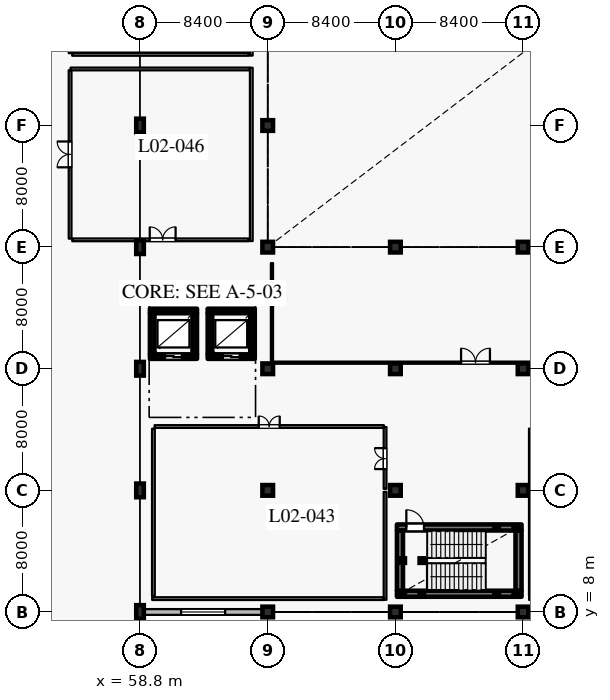
"""IFC4 building model, lengths in metres.
Left out: names, types, materials, properties, quantities, classifications, styles, units other than length and angle.
Written with IfcOpenShell. Run it as: python <this file> out.ifc"""

import sys

from ifc_helpers import new_model, si_unit, direction, frame, frame_2d, origin, origin_2d, place, context, subcontext, project, spatial, rectangle, hollow_rectangle, extrude, element, fill, save


model = new_model("IFC4")
c1 = context("Model", 3, precision=1e-05, world=origin(), true_north=direction((0.0, 1.0)))
c2 = subcontext(c1, "Body", "Model", "MODEL_VIEW")
j1 = project(units=[si_unit("LENGTHUNIT", "METRE"), si_unit("PLANEANGLEUNIT", "RADIAN")], contexts=[c1])
p1 = place(None, origin())
s1 = spatial("IfcSite", under=j1, at=p1, CompositionType="ELEMENT")
p2 = place(p1, origin())
s2 = spatial("IfcBuilding", under=s1, at=p2, CompositionType="ELEMENT")
p3 = place(p2, frame((0.0, 0.0, 11.4)))
s3 = spatial("IfcBuildingStorey", under=s2, at=p3, CompositionType="ELEMENT", Elevation=11.4)
for number, where, z_axis, x_axis in (
    (1, (58.8, 8.0, 0.0), (0.0, 0.0, 1.0), (1.0, 0.0, 0.0)),
    (2, (58.8, 16.0, 0.0), (0.0, 0.0, 1.0), (1.0, 0.0, 0.0)),
    (3, (58.8, 24.0, 0.0), (0.0, 0.0, 1.0), (1.0, 0.0, 0.0)),
    (4, (58.8, 32.0, 0.0), (0.0, 0.0, 1.0), (1.0, 0.0, 0.0)),
    (5, (58.8, 40.0, 0.0), (0.0, 0.0, 1.0), (1.0, 0.0, 0.0)),
):
    element("IfcColumn", number, at=place(p3, frame(where, z_axis=z_axis, x_axis=x_axis)), inside=s3, PredefinedType="COLUMN", context=c2, shape_type="SweptSolid", body=[
        extrude(hollow_rectangle(XDim=0.5, YDim=0.9, WallThickness=0.024, at=origin_2d()), origin(), (0.0, 0.0, 1.0), 4.8),
    ])
for number, where, z_axis, x_axis in (
    (6, (67.2, 8.0, 0.0), (0.0, 0.0, 1.0), (1.0, 0.0, 0.0)),
    (7, (67.2, 16.0, 0.0), (0.0, 0.0, 1.0), (1.0, 0.0, 0.0)),
    (8, (67.2, 24.0, 0.0), (0.0, 0.0, 1.0), (1.0, 0.0, 0.0)),
    (9, (67.2, 32.0, 0.0), (0.0, 0.0, 1.0), (1.0, 0.0, 0.0)),
    (10, (67.2, 40.0, 0.0), (0.0, 0.0, 1.0), (1.0, 0.0, 0.0)),
    (11, (75.6, 8.0, 0.0), (0.0, 0.0, 1.0), (1.0, 0.0, 0.0)),
    (12, (75.6, 16.0, 0.0), (0.0, 0.0, 1.0), (1.0, 0.0, 0.0)),
    (13, (75.6, 24.0, 0.0), (0.0, 0.0, 1.0), (1.0, 0.0, 0.0)),
    (14, (75.6, 32.0, 0.0), (0.0, 0.0, 1.0), (1.0, 0.0, 0.0)),
    (15, (84.0, 8.0, 0.0), (0.0, 0.0, 1.0), (1.0, 0.0, 0.0)),
    (16, (84.0, 16.0, 0.0), (0.0, 0.0, 1.0), (1.0, 0.0, 0.0)),
    (17, (84.0, 24.0, 0.0), (0.0, 0.0, 1.0), (1.0, 0.0, 0.0)),
    (18, (84.0, 32.0, 0.0), (0.0, 0.0, 1.0), (1.0, 0.0, 0.0)),
):
    element("IfcColumn", number, at=place(p3, frame(where, z_axis=z_axis, x_axis=x_axis)), inside=s3, PredefinedType="COLUMN", context=c2, shape_type="SweptSolid", body=[
        extrude(rectangle(XDim=0.7, YDim=0.7, at=origin_2d()), origin(), (0.0, 0.0, 1.0), 4.8),
    ])
p4 = place(p3, frame((66.85, 8.0, 0.0), z_axis=(0.0, 0.0, 1.0), x_axis=(-1.0, 0.0, 0.0)))
e19 = element("IfcWall", 19, at=p4, inside=s3, PredefinedType="SOLIDWALL", context=c2, shape_type="SweptSolid", body=[
    extrude(rectangle(XDim=7.8, YDim=0.38, at=frame_2d((3.9, 0.0))), origin(), (0.0, 0.0, 1.0), 3.84),
])
p5 = place(p4, frame((2.45, 0.0, 0.95)))
e20 = element("IfcOpeningElement", 20, at=p5, cuts=e19, PredefinedType="OPENING", context=c2, shape_type="SweptSolid", body=[
    extrude(rectangle(XDim=2.9, YDim=1.75, at=frame_2d((1.45, 0.875))), frame((0.0, 0.2, 0.0), z_axis=(0.0, -1.0, 0.0), x_axis=(1.0, 0.0, 0.0)), (0.0, 0.0, 1.0), 0.4),
])
p6 = place(p3, frame((59.45, 24.8, 0.0), z_axis=(0.0, 0.0, 1.0), x_axis=(1.0, 0.0, 0.0)))
e21 = element("IfcWall", 21, at=p6, inside=s3, PredefinedType="SHEAR", context=c2, shape_type="SweptSolid", body=[
    extrude(rectangle(XDim=3.1, YDim=0.3, at=frame_2d((1.55, 0.0))), origin(), (0.0, 0.0, 1.0), 4.535),
])
p7 = place(p6, frame((1.0, 0.0, 0.0)))
e22 = element("IfcOpeningElement", 22, at=p7, cuts=e21, PredefinedType="OPENING", context=c2, shape_type="SweptSolid", body=[
    extrude(rectangle(XDim=1.1, YDim=2.2, at=frame_2d((0.55, 1.1))), frame((0.0, 0.16, 0.0), z_axis=(0.0, -1.0, 0.0), x_axis=(1.0, 0.0, 0.0)), (0.0, 0.0, 1.0), 0.32),
])
p8 = place(p3, frame((62.4, 24.955, 0.0), z_axis=(0.0, 0.0, 1.0), x_axis=(0.0, 1.0, 0.0)))
e23 = element("IfcWall", 23, at=p8, inside=s3, PredefinedType="SHEAR", context=c2, shape_type="SweptSolid", body=[
    extrude(rectangle(XDim=2.69, YDim=0.3, at=frame_2d((1.345, 0.0))), origin(), (0.0, 0.0, 1.0), 4.535),
])
p9 = place(p3, frame((62.55, 27.8, 0.0), z_axis=(0.0, 0.0, 1.0), x_axis=(-1.0, 0.0, 0.0)))
e24 = element("IfcWall", 24, at=p9, inside=s3, PredefinedType="SHEAR", context=c2, shape_type="SweptSolid", body=[
    extrude(rectangle(XDim=3.1, YDim=0.3, at=frame_2d((1.55, 0.0))), origin(), (0.0, 0.0, 1.0), 4.535),
])
p10 = place(p3, frame((59.6, 27.645, 0.0), z_axis=(0.0, 0.0, 1.0), x_axis=(0.0, -1.0, 0.0)))
e25 = element("IfcWall", 25, at=p10, inside=s3, PredefinedType="SHEAR", context=c2, shape_type="SweptSolid", body=[
    extrude(rectangle(XDim=2.69, YDim=0.3, at=frame_2d((1.345, 0.0))), origin(), (0.0, 0.0, 1.0), 4.535),
])
p11 = place(p3, frame((63.25, 24.8, 0.0), z_axis=(0.0, 0.0, 1.0), x_axis=(1.0, 0.0, 0.0)))
e26 = element("IfcWall", 26, at=p11, inside=s3, PredefinedType="SHEAR", context=c2, shape_type="SweptSolid", body=[
    extrude(rectangle(XDim=3.1, YDim=0.3, at=frame_2d((1.55, 0.0))), origin(), (0.0, 0.0, 1.0), 4.535),
])
p12 = place(p11, frame((1.0, 0.0, 0.0)))
e27 = element("IfcOpeningElement", 27, at=p12, cuts=e26, PredefinedType="OPENING", context=c2, shape_type="SweptSolid", body=[
    extrude(rectangle(XDim=1.1, YDim=2.2, at=frame_2d((0.55, 1.1))), frame((0.0, 0.16, 0.0), z_axis=(0.0, -1.0, 0.0), x_axis=(1.0, 0.0, 0.0)), (0.0, 0.0, 1.0), 0.32),
])
p13 = place(p3, frame((66.2, 24.955, 0.0), z_axis=(0.0, 0.0, 1.0), x_axis=(0.0, 1.0, 0.0)))
e28 = element("IfcWall", 28, at=p13, inside=s3, PredefinedType="SHEAR", context=c2, shape_type="SweptSolid", body=[
    extrude(rectangle(XDim=2.69, YDim=0.3, at=frame_2d((1.345, 0.0))), origin(), (0.0, 0.0, 1.0), 4.535),
])
p14 = place(p3, frame((66.35, 27.8, 0.0), z_axis=(0.0, 0.0, 1.0), x_axis=(-1.0, 0.0, 0.0)))
e29 = element("IfcWall", 29, at=p14, inside=s3, PredefinedType="SHEAR", context=c2, shape_type="SweptSolid", body=[
    extrude(rectangle(XDim=3.1, YDim=0.3, at=frame_2d((1.55, 0.0))), origin(), (0.0, 0.0, 1.0), 4.535),
])
p15 = place(p3, frame((63.4, 27.645, 0.0), z_axis=(0.0, 0.0, 1.0), x_axis=(0.0, -1.0, 0.0)))
e30 = element("IfcWall", 30, at=p15, inside=s3, PredefinedType="SHEAR", context=c2, shape_type="SweptSolid", body=[
    extrude(rectangle(XDim=2.69, YDim=0.3, at=frame_2d((1.345, 0.0))), origin(), (0.0, 0.0, 1.0), 4.535),
])
p16 = place(p3, frame((75.7, 9.2, 0.0), z_axis=(0.0, 0.0, 1.0), x_axis=(1.0, 0.0, 0.0)))
e31 = element("IfcWall", 31, at=p16, inside=s3, PredefinedType="SHEAR", context=c2, shape_type="SweptSolid", body=[
    extrude(rectangle(XDim=8.2, YDim=0.4, at=frame_2d((4.1, 0.0))), origin(), (0.0, 0.0, 1.0), 4.535),
])
p17 = place(p3, frame((83.7, 9.405, 0.0), z_axis=(0.0, 0.0, 1.0), x_axis=(0.0, 1.0, 0.0)))
e32 = element("IfcWall", 32, at=p17, inside=s3, PredefinedType="SHEAR", context=c2, shape_type="SweptSolid", body=[
    extrude(rectangle(XDim=3.95, YDim=0.4, at=frame_2d((1.975, 0.0))), origin(), (0.0, 0.0, 1.0), 4.535),
])
p18 = place(p3, frame((75.7, 13.56, 0.0), z_axis=(0.0, 0.0, 1.0), x_axis=(1.0, 0.0, 0.0)))
e33 = element("IfcWall", 33, at=p18, inside=s3, PredefinedType="SHEAR", context=c2, shape_type="SweptSolid", body=[
    extrude(rectangle(XDim=8.2, YDim=0.4, at=frame_2d((4.1, 0.0))), origin(), (0.0, 0.0, 1.0), 4.535),
])
p19 = place(p18, frame((0.62, 0.0, 0.0)))
e34 = element("IfcOpeningElement", 34, at=p19, cuts=e33, PredefinedType="OPENING", context=c2, shape_type="SweptSolid", body=[
    extrude(rectangle(XDim=1.16, YDim=2.2, at=frame_2d((0.58, 1.1))), frame((0.0, 0.21, 0.0), z_axis=(0.0, -1.0, 0.0), x_axis=(1.0, 0.0, 0.0)), (0.0, 0.0, 1.0), 0.42),
])
p20 = place(p3, frame((75.9, 9.405, 0.0), z_axis=(0.0, 0.0, 1.0), x_axis=(0.0, 1.0, 0.0)))
e35 = element("IfcWall", 35, at=p20, inside=s3, PredefinedType="SHEAR", context=c2, shape_type="SweptSolid", body=[
    extrude(rectangle(XDim=3.95, YDim=0.4, at=frame_2d((1.975, 0.0))), origin(), (0.0, 0.0, 1.0), 4.535),
])
for number, where, z_axis, x_axis in (
    (36, (76.08, 9.2, 0.0), (0.0, 0.0, 1.0), (1.0, 0.0, 0.0)),
    (37, (76.08, 11.38, 0.0), (0.0, 0.0, 1.0), (1.0, 0.0, 0.0)),
    (38, (77.34, 9.2, 0.0), (0.0, 0.0, 1.0), (1.0, 0.0, 0.0)),
    (39, (77.34, 11.38, 0.0), (0.0, 0.0, 1.0), (1.0, 0.0, 0.0)),
):
    element("IfcColumn", number, at=place(p3, frame(where, z_axis=z_axis, x_axis=x_axis)), inside=s3, PredefinedType="COLUMN", context=c2, shape_type="SweptSolid", body=[
        extrude(hollow_rectangle(XDim=0.3, YDim=0.3, WallThickness=0.012, at=origin_2d()), origin(), (0.0, 0.0, 1.0), 4.62),
    ])
for number, where, z_axis, x_axis in (
    (40, (82.26, 9.2, -2.7), (0.0, 0.0, 1.0), (1.0, 0.0, 0.0)),
    (41, (82.26, 13.56, -2.7), (0.0, 0.0, 1.0), (1.0, 0.0, 0.0)),
    (42, (83.52, 9.2, -2.7), (0.0, 0.0, 1.0), (1.0, 0.0, 0.0)),
    (43, (83.52, 13.56, -2.7), (0.0, 0.0, 1.0), (1.0, 0.0, 0.0)),
):
    element("IfcColumn", number, at=place(p3, frame(where, z_axis=z_axis, x_axis=x_axis)), inside=s3, PredefinedType="COLUMN", context=c2, shape_type="SweptSolid", body=[
        extrude(hollow_rectangle(XDim=0.3, YDim=0.3, WallThickness=0.012, at=origin_2d()), origin(), (0.0, 0.0, 1.0), 4.92),
    ])
p21 = place(p3, frame((59.76, 20.2, 0.0), z_axis=(0.0, 0.0, 1.0), x_axis=(1.0, 0.0, 0.0)))
e44 = element("IfcWall", 44, at=p21, inside=s3, PredefinedType="PARTITIONING", context=c2, shape_type="SweptSolid", body=[
    extrude(rectangle(XDim=15.08, YDim=0.18, at=frame_2d((7.54, 0.0))), origin(), (0.0, 0.0, 1.0), 4.535),
])
p22 = place(p21, frame((6.85, 0.0, 0.0)))
e45 = element("IfcOpeningElement", 45, at=p22, cuts=e44, PredefinedType="OPENING", context=c2, shape_type="SweptSolid", body=[
    extrude(rectangle(XDim=1.38, YDim=2.3, at=frame_2d((0.69, 1.15))), frame((0.0, 0.1, 0.0), z_axis=(0.0, -1.0, 0.0), x_axis=(1.0, 0.0, 0.0)), (0.0, 0.0, 1.0), 0.2),
])
for number, where, z_axis, x_axis in (
    (46, (59.68, 9.05, 0.0), (0.0, 0.0, 1.0), (0.0, 1.0, 0.0)),
    (47, (84.48, 9.05, 0.0), (0.0, 0.0, 1.0), (0.0, 1.0, 0.0)),
):
    element("IfcWall", number, at=place(p3, frame(where, z_axis=z_axis, x_axis=x_axis)), inside=s3, PredefinedType="PARTITIONING", context=c2, shape_type="SweptSolid", body=[
        extrude(rectangle(XDim=11.01, YDim=0.18, at=frame_2d((5.505, 0.0))), origin(), (0.0, 0.0, 1.0), 4.535),
    ])
p23 = place(p3, frame((67.56, 24.4, 0.0), z_axis=(0.0, 0.0, 1.0), x_axis=(1.0, 0.0, 0.0)))
e48 = element("IfcWall", 48, at=p23, inside=s3, PredefinedType="PARTITIONING", context=c2, shape_type="SweptSolid", body=[
    extrude(rectangle(XDim=32.68, YDim=0.14, at=frame_2d((16.34, 0.0))), origin(), (0.0, 0.0, 1.0), 4.535),
])
p24 = place(p23, frame((12.36, 0.0, 0.0)))
e49 = element("IfcOpeningElement", 49, at=p24, cuts=e48, PredefinedType="OPENING", context=c2, shape_type="SweptSolid", body=[
    extrude(rectangle(XDim=1.9, YDim=2.4, at=frame_2d((0.95, 1.2))), frame((0.0, 0.08, 0.0), z_axis=(0.0, -1.0, 0.0), x_axis=(1.0, 0.0, 0.0)), (0.0, 0.0, 1.0), 0.16),
])
p25 = place(p3, frame((67.48, 24.54, 0.0), z_axis=(0.0, 0.0, 1.0), x_axis=(0.0, 1.0, 0.0)))
e50 = element("IfcWall", 50, at=p25, inside=s3, PredefinedType="PARTITIONING", context=c2, shape_type="SweptSolid", body=[
    extrude(rectangle(XDim=6.41, YDim=0.14, at=frame_2d((3.205, 0.0))), origin(), (0.0, 0.0, 1.0), 4.535),
])
p26 = place(p3, frame((54.2, 32.56, 0.0), z_axis=(0.0, 0.0, 1.0), x_axis=(0.0, 1.0, 0.0)))
e51 = element("IfcWall", 51, at=p26, inside=s3, PredefinedType="PARTITIONING", context=c2, shape_type="SweptSolid", body=[
    extrude(rectangle(XDim=11.08, YDim=0.18, at=frame_2d((5.54, 0.0))), origin(), (0.0, 0.0, 1.0), 4.535),
])
p27 = place(p26, frame((4.69, 0.0, 0.0)))
e52 = element("IfcOpeningElement", 52, at=p27, cuts=e51, PredefinedType="OPENING", context=c2, shape_type="SweptSolid", body=[
    extrude(rectangle(XDim=1.7, YDim=2.3, at=frame_2d((0.85, 1.15))), frame((0.0, 0.1, 0.0), z_axis=(0.0, -1.0, 0.0), x_axis=(1.0, 0.0, 0.0)), (0.0, 0.0, 1.0), 0.2),
])
p28 = place(p3, frame((54.34, 32.48, 0.0), z_axis=(0.0, 0.0, 1.0), x_axis=(1.0, 0.0, 0.0)))
e53 = element("IfcWall", 53, at=p28, inside=s3, PredefinedType="PARTITIONING", context=c2, shape_type="SweptSolid", body=[
    extrude(rectangle(XDim=11.61, YDim=0.18, at=frame_2d((5.805, 0.0))), origin(), (0.0, 0.0, 1.0), 4.535),
])
p29 = place(p28, frame((5.1, 0.0, 0.0)))
e54 = element("IfcOpeningElement", 54, at=p29, cuts=e53, PredefinedType="OPENING", context=c2, shape_type="SweptSolid", body=[
    extrude(rectangle(XDim=1.7, YDim=2.3, at=frame_2d((0.85, 1.15))), frame((0.0, 0.1, 0.0), z_axis=(0.0, -1.0, 0.0), x_axis=(1.0, 0.0, 0.0)), (0.0, 0.0, 1.0), 0.2),
])
p30 = place(p3, frame((54.2, 44.76, 0.0), z_axis=(0.0, 0.0, 1.0), x_axis=(0.0, 1.0, 0.0)))
e55 = element("IfcWall", 55, at=p30, inside=s3, PredefinedType="PARTITIONING", context=c2, shape_type="SweptSolid", body=[
    extrude(rectangle(XDim=10.48, YDim=0.18, at=frame_2d((5.24, 0.0))), origin(), (0.0, 0.0, 1.0), 4.535),
])
p31 = place(p30, frame((1.5, 0.0, 0.0)))
e56 = element("IfcOpeningElement", 56, at=p31, cuts=e55, PredefinedType="OPENING", context=c2, shape_type="SweptSolid", body=[
    extrude(rectangle(XDim=1.7, YDim=2.3, at=frame_2d((0.85, 1.15))), frame((0.0, 0.1, 0.0), z_axis=(0.0, -1.0, 0.0), x_axis=(1.0, 0.0, 0.0)), (0.0, 0.0, 1.0), 0.2),
])
p32 = place(p30, frame((7.2, 0.0, 0.0)))
e57 = element("IfcOpeningElement", 57, at=p32, cuts=e55, PredefinedType="OPENING", context=c2, shape_type="SweptSolid", body=[
    extrude(rectangle(XDim=1.7, YDim=2.3, at=frame_2d((0.85, 1.15))), frame((0.0, 0.1, 0.0), z_axis=(0.0, -1.0, 0.0), x_axis=(1.0, 0.0, 0.0)), (0.0, 0.0, 1.0), 0.2),
])
p33 = place(p3, frame((54.34, 44.68, 0.0), z_axis=(0.0, 0.0, 1.0), x_axis=(1.0, 0.0, 0.0)))
e58 = element("IfcWall", 58, at=p33, inside=s3, PredefinedType="PARTITIONING", context=c2, shape_type="SweptSolid", body=[
    extrude(rectangle(XDim=11.61, YDim=0.18, at=frame_2d((5.805, 0.0))), origin(), (0.0, 0.0, 1.0), 4.535),
])
p34 = place(p3, frame((74.92, 8.8, 0.0), z_axis=(0.0, 0.0, 1.0), x_axis=(0.0, 1.0, 0.0)))
e59 = element("IfcWall", 59, at=p34, inside=s3, PredefinedType="PARTITIONING", context=c2, shape_type="SweptSolid", body=[
    extrude(rectangle(XDim=7.1, YDim=0.18, at=frame_2d((3.55, 0.0))), origin(), (0.0, 0.0, 1.0), 4.535),
])
p35 = place(p3, frame((74.92, 16.1, 0.0), z_axis=(0.0, 0.0, 1.0), x_axis=(0.0, 1.0, 0.0)))
e60 = element("IfcWall", 60, at=p35, inside=s3, PredefinedType="PARTITIONING", context=c2, shape_type="SweptSolid", body=[
    extrude(rectangle(XDim=4.068, YDim=0.18, at=frame_2d((2.034, 0.0))), origin(), (0.0, 0.0, 1.0), 4.535),
])
p36 = place(p35, frame((1.3, 0.0, 0.0)))
e61 = element("IfcOpeningElement", 61, at=p36, cuts=e60, PredefinedType="OPENING", context=c2, shape_type="SweptSolid", body=[
    extrude(rectangle(XDim=1.38, YDim=2.3, at=frame_2d((0.69, 1.15))), frame((0.0, 0.1, 0.0), z_axis=(0.0, -1.0, 0.0), x_axis=(1.0, 0.0, 0.0)), (0.0, 0.0, 1.0), 0.2),
])
p37 = place(p3, frame((59.6, 8.88, 0.0), z_axis=(0.0, 0.0, 1.0), x_axis=(1.0, 0.0, 0.0)))
e62 = element("IfcWall", 62, at=p37, inside=s3, PredefinedType="PARTITIONING", context=c2, shape_type="SweptSolid", body=[
    extrude(rectangle(XDim=15.23, YDim=0.18, at=frame_2d((7.615, 0.0))), origin(), (0.0, 0.0, 1.0), 4.535),
])
p38 = place(p3, frame((84.4, 8.88, 0.0), z_axis=(0.0, 0.0, 1.0), x_axis=(1.0, 0.0, 0.0)))
e63 = element("IfcWall", 63, at=p38, inside=s3, PredefinedType="PARTITIONING", context=c2, shape_type="SweptSolid", body=[
    extrude(rectangle(XDim=15.83, YDim=0.18, at=frame_2d((7.915, 0.0))), origin(), (0.0, 0.0, 1.0), 4.535),
])
p39 = place(p3, frame((66.12, 32.4, 0.0), z_axis=(0.0, 0.0, 1.0), x_axis=(0.0, 1.0, 0.0)))
e64 = element("IfcWall", 64, at=p39, inside=s3, PredefinedType="PARTITIONING", context=c2, shape_type="SweptSolid", body=[
    extrude(rectangle(XDim=11.4, YDim=0.18, at=frame_2d((5.7, 0.0))), origin(), (0.0, 0.0, 1.0), 4.535),
])
p40 = place(p3, frame((54.232, 43.72, 0.0), z_axis=(0.0, 0.0, 1.0), x_axis=(1.0, 0.0, 0.0)))
e65 = element("IfcWall", 65, at=p40, inside=s3, PredefinedType="PARTITIONING", context=c2, shape_type="SweptSolid", body=[
    extrude(rectangle(XDim=11.798, YDim=0.18, at=frame_2d((5.899, 0.0))), origin(), (0.0, 0.0, 1.0), 4.535),
])
p41 = place(p3, frame((66.12, 44.6, 0.0), z_axis=(0.0, 0.0, 1.0), x_axis=(0.0, 1.0, 0.0)))
e66 = element("IfcWall", 66, at=p41, inside=s3, PredefinedType="PARTITIONING", context=c2, shape_type="SweptSolid", body=[
    extrude(rectangle(XDim=10.8, YDim=0.18, at=frame_2d((5.4, 0.0))), origin(), (0.0, 0.0, 1.0), 4.535),
])
p42 = place(p5, origin())
e67 = element("IfcWindow", 67, at=p42, inside=s3, PartitioningType="DOUBLE_PANEL_VERTICAL", PredefinedType="WINDOW", context=c2, shape_type="SweptSolid", body=[
    extrude(rectangle(XDim=2.9, YDim=1.75, at=frame_2d((1.45, 0.875))), frame((0.0, 0.03, 0.0), z_axis=(0.0, -1.0, 0.0), x_axis=(1.0, 0.0, 0.0)), (0.0, 0.0, 1.0), 0.06),
])
fill(e20, e67)
p43 = place(p7, origin())
e68 = element("IfcDoor", 68, at=p43, inside=s3, OperationType="DOUBLE_DOOR_SLIDING", PredefinedType="DOOR", context=c2, shape_type="SweptSolid", body=[
    extrude(rectangle(XDim=1.1, YDim=2.2, at=frame_2d((0.55, 1.1))), frame((0.0, 0.025, 0.0), z_axis=(0.0, -1.0, 0.0), x_axis=(1.0, 0.0, 0.0)), (0.0, 0.0, 1.0), 0.05),
])
fill(e22, e68)
p44 = place(p12, origin())
e69 = element("IfcDoor", 69, at=p44, inside=s3, OperationType="DOUBLE_DOOR_SLIDING", PredefinedType="DOOR", context=c2, shape_type="SweptSolid", body=[
    extrude(rectangle(XDim=1.1, YDim=2.2, at=frame_2d((0.55, 1.1))), frame((0.0, 0.025, 0.0), z_axis=(0.0, -1.0, 0.0), x_axis=(1.0, 0.0, 0.0)), (0.0, 0.0, 1.0), 0.05),
])
fill(e27, e69)
p45 = place(p19, origin())
e70 = element("IfcDoor", 70, at=p45, inside=s3, OperationType="SINGLE_SWING_LEFT", PredefinedType="DOOR", context=c2, shape_type="SweptSolid", body=[
    extrude(rectangle(XDim=1.16, YDim=2.2, at=frame_2d((0.58, 1.1))), frame((0.0, 0.025, 0.0), z_axis=(0.0, -1.0, 0.0), x_axis=(1.0, 0.0, 0.0)), (0.0, 0.0, 1.0), 0.05),
])
fill(e34, e70)
p46 = place(p22, origin())
e71 = element("IfcDoor", 71, at=p46, inside=s3, OperationType="DOUBLE_DOOR_SINGLE_SWING", PredefinedType="DOOR", context=c2, shape_type="SweptSolid", body=[
    extrude(rectangle(XDim=1.38, YDim=2.3, at=frame_2d((0.69, 1.15))), frame((0.0, 0.025, 0.0), z_axis=(0.0, -1.0, 0.0), x_axis=(1.0, 0.0, 0.0)), (0.0, 0.0, 1.0), 0.05),
])
fill(e45, e71)
p47 = place(p24, origin())
e72 = element("IfcDoor", 72, at=p47, inside=s3, OperationType="DOUBLE_DOOR_SINGLE_SWING", PredefinedType="DOOR", context=c2, shape_type="SweptSolid", body=[
    extrude(rectangle(XDim=1.9, YDim=2.4, at=frame_2d((0.95, 1.2))), frame((0.0, 0.025, 0.0), z_axis=(0.0, -1.0, 0.0), x_axis=(1.0, 0.0, 0.0)), (0.0, 0.0, 1.0), 0.05),
])
fill(e49, e72)
p48 = place(p27, origin())
e73 = element("IfcDoor", 73, at=p48, inside=s3, OperationType="DOUBLE_DOOR_SINGLE_SWING", PredefinedType="DOOR", context=c2, shape_type="SweptSolid", body=[
    extrude(rectangle(XDim=1.7, YDim=2.3, at=frame_2d((0.85, 1.15))), frame((0.0, 0.025, 0.0), z_axis=(0.0, -1.0, 0.0), x_axis=(1.0, 0.0, 0.0)), (0.0, 0.0, 1.0), 0.05),
])
fill(e52, e73)
p49 = place(p36, origin())
e74 = element("IfcDoor", 74, at=p49, inside=s3, OperationType="DOUBLE_DOOR_SINGLE_SWING", PredefinedType="DOOR", context=c2, shape_type="SweptSolid", body=[
    extrude(rectangle(XDim=1.38, YDim=2.3, at=frame_2d((0.69, 1.15))), frame((0.0, 0.025, 0.0), z_axis=(0.0, -1.0, 0.0), x_axis=(1.0, 0.0, 0.0)), (0.0, 0.0, 1.0), 0.05),
])
fill(e61, e74)
p50 = place(p29, origin())
e75 = element("IfcDoor", 75, at=p50, inside=s3, OperationType="DOUBLE_DOOR_SINGLE_SWING", PredefinedType="DOOR", context=c2, shape_type="SweptSolid", body=[
    extrude(rectangle(XDim=1.7, YDim=2.3, at=frame_2d((0.85, 1.15))), frame((0.0, 0.025, 0.0), z_axis=(0.0, -1.0, 0.0), x_axis=(1.0, 0.0, 0.0)), (0.0, 0.0, 1.0), 0.05),
])
fill(e54, e75)
save(model, sys.argv[1])
